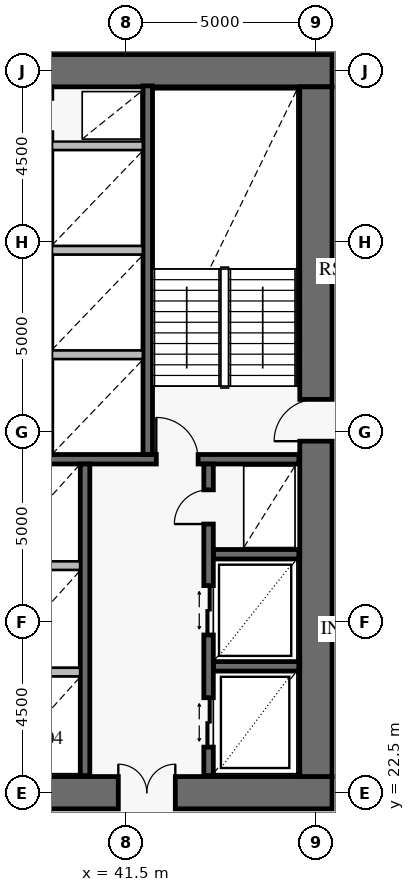
"""IFC4 building model, lengths in metres.
Left out: names, types, materials, properties, quantities, classifications, styles, units other than length and angle.
Written with IfcOpenShell. Run it as: python <this file> out.ifc"""

import sys

from ifc_helpers import new_model, si_unit, direction, frame, frame_2d, origin, place, context, subcontext, project, spatial, rectangle, extrude, element, fill, save


model = new_model("IFC4")
c1 = context("Model", 3, precision=1e-05, world=origin(), true_north=direction((0.0, 1.0)))
c2 = subcontext(c1, "Body", "Model", "MODEL_VIEW")
j1 = project(units=[si_unit("LENGTHUNIT", "METRE"), si_unit("PLANEANGLEUNIT", "RADIAN")], contexts=[c1])
p1 = place(None, origin())
s1 = spatial("IfcSite", under=j1, at=p1, CompositionType="ELEMENT")
p2 = place(p1, origin())
s2 = spatial("IfcBuilding", under=s1, at=p2, CompositionType="ELEMENT")
p3 = place(p2, frame((0.0, 0.0, 16.2)))
s3 = spatial("IfcBuildingStorey", under=s2, at=p3, CompositionType="ELEMENT", Elevation=16.2)
p4 = place(p3, frame((37.35, 22.5, 0.0), z_axis=(0.0, 0.0, 1.0), x_axis=(1.0, 0.0, 0.0)))
e1 = element("IfcWall", 1, at=p4, inside=s3, PredefinedType="SHEAR", context=c2, shape_type="SweptSolid", body=[
    extrude(rectangle(XDim=9.575, YDim=0.85, at=frame_2d((4.788, 0.0))), origin(), (0.0, 0.0, 1.0), 4.2),
])
p5 = place(p4, frame((3.95, 0.0, 0.0)))
e2 = element("IfcOpeningElement", 2, at=p5, cuts=e1, PredefinedType="OPENING", context=c2, shape_type="SweptSolid", body=[
    extrude(rectangle(XDim=1.5, YDim=2.15, at=frame_2d((0.75, 1.075))), frame((0.0, 0.437, 0.0), z_axis=(0.0, -1.0, 0.0), x_axis=(1.0, 0.0, 0.0)), (0.0, 0.0, 1.0), 0.874),
])
p6 = place(p3, frame((46.925, 41.5, 0.0), z_axis=(0.0, 0.0, 1.0), x_axis=(-1.0, 0.0, 0.0)))
e3 = element("IfcWall", 3, at=p6, inside=s3, PredefinedType="SHEAR", context=c2, shape_type="SweptSolid", body=[
    extrude(rectangle(XDim=7.975, YDim=0.85, at=frame_2d((3.988, 0.0))), origin(), (0.0, 0.0, 1.0), 4.2),
])
p7 = place(p3, frame((46.5, 22.925, 0.0), z_axis=(0.0, 0.0, 1.0), x_axis=(0.0, 1.0, 0.0)))
e4 = element("IfcWall", 4, at=p7, inside=s3, PredefinedType="SHEAR", context=c2, shape_type="SweptSolid", body=[
    extrude(rectangle(XDim=18.15, YDim=0.85, at=frame_2d((9.075, 0.0))), origin(), (0.0, 0.0, 1.0), 4.2),
])
p8 = place(p7, frame((8.825, 0.0, 0.0)))
e5 = element("IfcOpeningElement", 5, at=p8, cuts=e4, PredefinedType="OPENING", context=c2, shape_type="SweptSolid", body=[
    extrude(rectangle(XDim=1.1, YDim=2.15, at=frame_2d((0.55, 1.075))), frame((0.0, 0.437, 0.0), z_axis=(0.0, -1.0, 0.0), x_axis=(1.0, 0.0, 0.0)), (0.0, 0.0, 1.0), 0.874),
])
p9 = place(p3, frame((25.95, 31.275, 0.0), z_axis=(0.0, 0.0, 1.0), x_axis=(1.0, 0.0, 0.0)))
e6 = element("IfcWall", 6, at=p9, inside=s3, PredefinedType="SOLIDWALL", context=c2, shape_type="SweptSolid", body=[
    extrude(rectangle(XDim=20.1, YDim=0.25, at=frame_2d((10.05, 0.0))), origin(), (0.0, 0.0, 1.0), 4.2),
])
p10 = place(p9, frame((2.6, 0.0, 0.0)))
e7 = element("IfcOpeningElement", 7, at=p10, cuts=e6, PredefinedType="OPENING", context=c2, shape_type="SweptSolid", body=[
    extrude(rectangle(XDim=1.1, YDim=2.15, at=frame_2d((0.55, 1.075))), frame((0.0, 0.137, 0.0), z_axis=(0.0, -1.0, 0.0), x_axis=(1.0, 0.0, 0.0)), (0.0, 0.0, 1.0), 0.274),
])
p11 = place(p9, frame((10.6, 0.0, 0.0)))
e8 = element("IfcOpeningElement", 8, at=p11, cuts=e6, PredefinedType="OPENING", context=c2, shape_type="SweptSolid", body=[
    extrude(rectangle(XDim=1.1, YDim=2.15, at=frame_2d((0.55, 1.075))), frame((0.0, 0.137, 0.0), z_axis=(0.0, -1.0, 0.0), x_axis=(1.0, 0.0, 0.0)), (0.0, 0.0, 1.0), 0.274),
])
p12 = place(p9, frame((16.35, 0.0, 0.0)))
e9 = element("IfcOpeningElement", 9, at=p12, cuts=e6, PredefinedType="OPENING", context=c2, shape_type="SweptSolid", body=[
    extrude(rectangle(XDim=1.1, YDim=2.15, at=frame_2d((0.55, 1.075))), frame((0.0, 0.137, 0.0), z_axis=(0.0, -1.0, 0.0), x_axis=(1.0, 0.0, 0.0)), (0.0, 0.0, 1.0), 0.274),
])
p13 = place(p3, frame((42.075, 31.4, 0.0), z_axis=(0.0, 0.0, 1.0), x_axis=(0.0, 1.0, 0.0)))
e10 = element("IfcWall", 10, at=p13, inside=s3, PredefinedType="SOLIDWALL", context=c2, shape_type="SweptSolid", body=[
    extrude(rectangle(XDim=9.7, YDim=0.25, at=frame_2d((4.85, 0.0))), origin(), (0.0, 0.0, 1.0), 4.2),
])
p14 = place(p3, frame((40.425, 22.95, 0.0), z_axis=(0.0, 0.0, 1.0), x_axis=(0.0, 1.0, 0.0)))
e11 = element("IfcWall", 11, at=p14, inside=s3, PredefinedType="SOLIDWALL", context=c2, shape_type="SweptSolid", body=[
    extrude(rectangle(XDim=8.2, YDim=0.25, at=frame_2d((4.1, 0.0))), origin(), (0.0, 0.0, 1.0), 4.2),
])
for number, where, z_axis, x_axis in (
    (12, (43.8, 25.825, 0.0), (0.0, 0.0, 1.0), (1.0, 0.0, 0.0)),
    (13, (43.8, 28.775, 0.0), (0.0, 0.0, 1.0), (1.0, 0.0, 0.0)),
):
    element("IfcWall", number, at=place(p3, frame(where, z_axis=z_axis, x_axis=x_axis)), inside=s3, PredefinedType="SOLIDWALL", context=c2, shape_type="SweptSolid", body=[
        extrude(rectangle(XDim=2.25, YDim=0.25, at=frame_2d((1.125, 0.0))), origin(), (0.0, 0.0, 1.0), 4.2),
    ])
p15 = place(p3, frame((43.675, 22.95, 0.0), z_axis=(0.0, 0.0, 1.0), x_axis=(0.0, 1.0, 0.0)))
e14 = element("IfcWall", 14, at=p15, inside=s3, PredefinedType="SOLIDWALL", context=c2, shape_type="SweptSolid", body=[
    extrude(rectangle(XDim=8.2, YDim=0.25, at=frame_2d((4.1, 0.0))), origin(), (0.0, 0.0, 1.0), 4.2),
])
p16 = place(p15, frame((0.75, 0.0, 0.0)))
e15 = element("IfcOpeningElement", 15, at=p16, cuts=e14, PredefinedType="OPENING", context=c2, shape_type="SweptSolid", body=[
    extrude(rectangle(XDim=1.3, YDim=2.3, at=frame_2d((0.65, 1.15))), frame((0.0, 0.137, 0.0), z_axis=(0.0, -1.0, 0.0), x_axis=(1.0, 0.0, 0.0)), (0.0, 0.0, 1.0), 0.274),
])
p17 = place(p15, frame((3.7, 0.0, 0.0)))
e16 = element("IfcOpeningElement", 16, at=p17, cuts=e14, PredefinedType="OPENING", context=c2, shape_type="SweptSolid", body=[
    extrude(rectangle(XDim=1.3, YDim=2.3, at=frame_2d((0.65, 1.15))), frame((0.0, 0.137, 0.0), z_axis=(0.0, -1.0, 0.0), x_axis=(1.0, 0.0, 0.0)), (0.0, 0.0, 1.0), 0.274),
])
p18 = place(p15, frame((6.62, 0.0, 0.0)))
e17 = element("IfcOpeningElement", 17, at=p18, cuts=e14, PredefinedType="OPENING", context=c2, shape_type="SweptSolid", body=[
    extrude(rectangle(XDim=0.9, YDim=2.1, at=frame_2d((0.45, 1.05))), frame((0.0, 0.137, 0.0), z_axis=(0.0, -1.0, 0.0), x_axis=(1.0, 0.0, 0.0)), (0.0, 0.0, 1.0), 0.274),
])
for number, where, z_axis, x_axis in (
    (18, (39.558, 34.025, 0.0), (0.0, 0.0, 1.0), (1.0, 0.0, 0.0)),
    (19, (39.558, 36.775, 0.0), (0.0, 0.0, 1.0), (1.0, 0.0, 0.0)),
    (20, (39.558, 39.525, 0.0), (0.0, 0.0, 1.0), (1.0, 0.0, 0.0)),
):
    element("IfcWall", number, at=place(p3, frame(where, z_axis=z_axis, x_axis=x_axis)), inside=s3, PredefinedType="PARTITIONING", context=c2, shape_type="SweptSolid", body=[
        extrude(rectangle(XDim=2.384, YDim=0.22, at=frame_2d((1.192, 0.0))), origin(), (0.0, 0.0, 1.0), 3.92),
    ])
for number, where, z_axis, x_axis in (
    (21, (38.008, 25.675, 0.0), (0.0, 0.0, 1.0), (1.0, 0.0, 0.0)),
    (22, (38.008, 28.475, 0.0), (0.0, 0.0, 1.0), (1.0, 0.0, 0.0)),
):
    element("IfcWall", number, at=place(p3, frame(where, z_axis=z_axis, x_axis=x_axis)), inside=s3, PredefinedType="PARTITIONING", context=c2, shape_type="SweptSolid", body=[
        extrude(rectangle(XDim=2.284, YDim=0.22, at=frame_2d((1.142, 0.0))), origin(), (0.0, 0.0, 1.0), 3.92),
    ])
p19 = place(p8, origin())
e23 = element("IfcDoor", 23, at=p19, inside=s3, OperationType="SINGLE_SWING_LEFT", PredefinedType="USERDEFINED", context=c2, shape_type="SweptSolid", body=[
    extrude(rectangle(XDim=1.1, YDim=2.15, at=frame_2d((0.55, 1.075))), frame((0.0, 0.025, 0.0), z_axis=(0.0, -1.0, 0.0), x_axis=(1.0, 0.0, 0.0)), (0.0, 0.0, 1.0), 0.05),
])
fill(e5, e23)
p20 = place(p5, origin())
e24 = element("IfcDoor", 24, at=p20, inside=s3, OperationType="DOUBLE_DOOR_SINGLE_SWING", PredefinedType="DOOR", context=c2, shape_type="SweptSolid", body=[
    extrude(rectangle(XDim=1.5, YDim=2.15, at=frame_2d((0.75, 1.075))), frame((0.0, 0.025, 0.0), z_axis=(0.0, -1.0, 0.0), x_axis=(1.0, 0.0, 0.0)), (0.0, 0.0, 1.0), 0.05),
])
fill(e2, e24)
p21 = place(p12, origin())
e25 = element("IfcDoor", 25, at=p21, inside=s3, OperationType="SINGLE_SWING_LEFT", PredefinedType="USERDEFINED", context=c2, shape_type="SweptSolid", body=[
    extrude(rectangle(XDim=1.1, YDim=2.15, at=frame_2d((0.55, 1.075))), frame((0.0, 0.025, 0.0), z_axis=(0.0, -1.0, 0.0), x_axis=(1.0, 0.0, 0.0)), (0.0, 0.0, 1.0), 0.05),
])
fill(e9, e25)
p22 = place(p16, origin())
e26 = element("IfcDoor", 26, at=p22, inside=s3, OperationType="DOUBLE_DOOR_SLIDING", PredefinedType="DOOR", context=c2, shape_type="SweptSolid", body=[
    extrude(rectangle(XDim=1.3, YDim=2.3, at=frame_2d((0.65, 1.15))), frame((0.0, 0.025, 0.0), z_axis=(0.0, -1.0, 0.0), x_axis=(1.0, 0.0, 0.0)), (0.0, 0.0, 1.0), 0.05),
])
fill(e15, e26)
p23 = place(p17, origin())
e27 = element("IfcDoor", 27, at=p23, inside=s3, OperationType="DOUBLE_DOOR_SLIDING", PredefinedType="DOOR", context=c2, shape_type="SweptSolid", body=[
    extrude(rectangle(XDim=1.3, YDim=2.3, at=frame_2d((0.65, 1.15))), frame((0.0, 0.025, 0.0), z_axis=(0.0, -1.0, 0.0), x_axis=(1.0, 0.0, 0.0)), (0.0, 0.0, 1.0), 0.05),
])
fill(e16, e27)
p24 = place(p18, origin())
e28 = element("IfcDoor", 28, at=p24, inside=s3, OperationType="SINGLE_SWING_LEFT", PredefinedType="DOOR", context=c2, shape_type="SweptSolid", body=[
    extrude(rectangle(XDim=0.9, YDim=2.1, at=frame_2d((0.45, 1.05))), frame((0.0, 0.025, 0.0), z_axis=(0.0, -1.0, 0.0), x_axis=(1.0, 0.0, 0.0)), (0.0, 0.0, 1.0), 0.05),
])
fill(e17, e28)
save(model, sys.argv[1])
